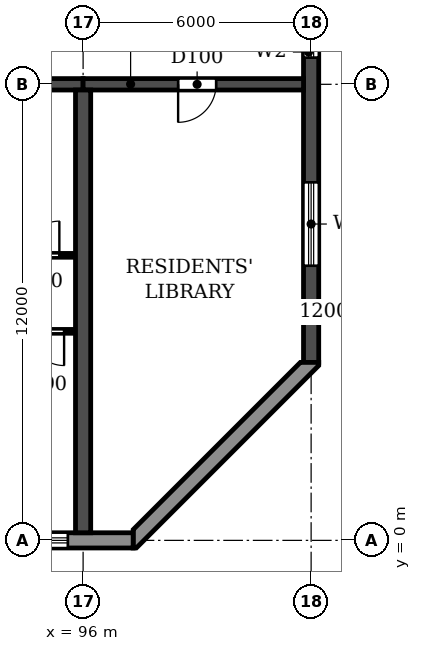
"""IFC4 building model, lengths in metres.
Left out: names, types, materials, properties, quantities, classifications, styles, units other than length and angle.
Written with IfcOpenShell. Run it as: python <this file> out.ifc"""

import sys

from ifc_helpers import new_model, si_unit, direction, frame, frame_2d, origin, place, context, subcontext, project, spatial, polyline, rectangle, outline, extrude, element, fill, save


model = new_model("IFC4")
c1 = context("Model", 3, precision=1e-05, world=origin(), true_north=direction((0.0, 1.0)))
c2 = subcontext(c1, "Body", "Model", "MODEL_VIEW")
j1 = project(units=[si_unit("LENGTHUNIT", "METRE"), si_unit("PLANEANGLEUNIT", "RADIAN")], contexts=[c1])
p1 = place(None, origin())
s1 = spatial("IfcSite", under=j1, at=p1, CompositionType="ELEMENT")
p2 = place(p1, origin())
s2 = spatial("IfcBuilding", under=s1, at=p2, CompositionType="ELEMENT")
p3 = place(p2, frame((0.0, 0.0, 33.3)))
s3 = spatial("IfcBuildingStorey", under=s2, at=p3, CompositionType="ELEMENT", Elevation=33.3)
p4 = place(p3, frame((96.0, 0.2, 0.0), z_axis=(0.0, 0.0, 1.0), x_axis=(0.0, 1.0, 0.0)))
e1 = element("IfcWall", 1, at=p4, inside=s3, PredefinedType="SHEAR", context=c2, shape_type="SweptSolid", body=[
    extrude(rectangle(XDim=11.65, YDim=0.4, at=frame_2d((5.825, 0.0))), origin(), (0.0, 0.0, 1.0), 3.05),
])
p5 = place(p3, frame((102.0, 4.683, 0.0), z_axis=(0.0, 0.0, 1.0), x_axis=(0.0, 1.0, 0.0)))
e2 = element("IfcWall", 2, at=p5, inside=s3, PredefinedType="SHEAR", context=c2, shape_type="SweptSolid", body=[
    extrude(rectangle(XDim=35.434, YDim=0.4, at=frame_2d((17.717, 0.0))), origin(), (0.0, 0.0, 1.0), 3.05),
])
p6 = place(p5, frame((15.917, 0.0, 0.9)))
e3 = element("IfcOpeningElement", 3, at=p6, cuts=e2, PredefinedType="OPENING", context=c2, shape_type="SweptSolid", body=[
    extrude(rectangle(XDim=1.2, YDim=1.5, at=frame_2d((0.6, 0.75))), frame((0.0, 0.21, 0.0), z_axis=(0.0, -1.0, 0.0), x_axis=(1.0, 0.0, 0.0)), (0.0, 0.0, 1.0), 0.42),
])
p7 = place(p5, frame((23.817, 0.0, 0.9)))
e4 = element("IfcOpeningElement", 4, at=p7, cuts=e2, PredefinedType="OPENING", context=c2, shape_type="SweptSolid", body=[
    extrude(rectangle(XDim=1.2, YDim=1.5, at=frame_2d((0.6, 0.75))), frame((0.0, 0.21, 0.0), z_axis=(0.0, -1.0, 0.0), x_axis=(1.0, 0.0, 0.0)), (0.0, 0.0, 1.0), 0.42),
])
p8 = place(p5, frame((8.017, 0.0, 0.9)))
e5 = element("IfcOpeningElement", 5, at=p8, cuts=e2, PredefinedType="OPENING", context=c2, shape_type="SweptSolid", body=[
    extrude(rectangle(XDim=1.2, YDim=1.5, at=frame_2d((0.6, 0.75))), frame((0.0, 0.21, 0.0), z_axis=(0.0, -1.0, 0.0), x_axis=(1.0, 0.0, 0.0)), (0.0, 0.0, 1.0), 0.42),
])
p9 = place(p5, frame((29.493, 0.0, 0.6)))
e6 = element("IfcOpeningElement", 6, at=p9, cuts=e2, PredefinedType="OPENING", context=c2, shape_type="SweptSolid", body=[
    extrude(rectangle(XDim=2.2, YDim=1.8, at=frame_2d((1.1, 0.9))), frame((0.0, 0.21, 0.0), z_axis=(0.0, -1.0, 0.0), x_axis=(1.0, 0.0, 0.0)), (0.0, 0.0, 1.0), 0.42),
])
p10 = place(p5, frame((2.541, 0.0, 0.6)))
e7 = element("IfcOpeningElement", 7, at=p10, cuts=e2, PredefinedType="OPENING", context=c2, shape_type="SweptSolid", body=[
    extrude(rectangle(XDim=2.2, YDim=1.8, at=frame_2d((1.1, 0.9))), frame((0.0, 0.21, 0.0), z_axis=(0.0, -1.0, 0.0), x_axis=(1.0, 0.0, 0.0)), (0.0, 0.0, 1.0), 0.42),
])
p11 = place(p3, frame((90.0, 12.0, 0.0), z_axis=(0.0, 0.0, 1.0), x_axis=(1.0, 0.0, 0.0)))
e8 = element("IfcWall", 8, at=p11, inside=s3, PredefinedType="SHEAR", context=c2, shape_type="SweptSolid", body=[
    extrude(rectangle(XDim=6.0, YDim=0.3, at=frame_2d((3.0, 0.0))), origin(), (0.0, 0.0, 1.0), 2.45),
])
p12 = place(p11, frame((2.45, 0.0, 0.0)))
e9 = element("IfcOpeningElement", 9, at=p12, cuts=e8, PredefinedType="OPENING", context=c2, shape_type="SweptSolid", body=[
    extrude(rectangle(XDim=1.0, YDim=2.1, at=frame_2d((0.5, 1.05))), frame((0.0, 0.16, 0.0), z_axis=(0.0, -1.0, 0.0), x_axis=(1.0, 0.0, 0.0)), (0.0, 0.0, 1.0), 0.32),
])
p13 = place(p3, frame((96.0, 12.0, 0.0), z_axis=(0.0, 0.0, 1.0), x_axis=(1.0, 0.0, 0.0)))
e10 = element("IfcWall", 10, at=p13, inside=s3, PredefinedType="SHEAR", context=c2, shape_type="SweptSolid", body=[
    extrude(rectangle(XDim=5.8, YDim=0.3, at=frame_2d((2.9, 0.0))), origin(), (0.0, 0.0, 1.0), 2.45),
])
p14 = place(p13, frame((2.5, 0.0, 0.0)))
e11 = element("IfcOpeningElement", 11, at=p14, cuts=e10, PredefinedType="OPENING", context=c2, shape_type="SweptSolid", body=[
    extrude(rectangle(XDim=1.0, YDim=2.1, at=frame_2d((0.5, 1.05))), frame((0.0, 0.16, 0.0), z_axis=(0.0, -1.0, 0.0), x_axis=(1.0, 0.0, 0.0)), (0.0, 0.0, 1.0), 0.32),
])
p15 = place(p3, frame((4.683, 0.0, 0.0), z_axis=(0.0, 0.0, 1.0), x_axis=(1.0, 0.0, 0.0)))
e12 = element("IfcWall", 12, at=p15, inside=s3, PredefinedType="STANDARD", context=c2, shape_type="SweptSolid", body=[
    extrude(rectangle(XDim=92.634, YDim=0.4, at=frame_2d((46.317, 0.0))), origin(), (0.0, 0.0, 1.0), 3.05),
])
p16 = place(p15, frame((1.717, 0.0, 0.9)))
e13 = element("IfcOpeningElement", 13, at=p16, cuts=e12, PredefinedType="OPENING", context=c2, shape_type="SweptSolid", body=[
    extrude(rectangle(XDim=2.2, YDim=1.5, at=frame_2d((1.1, 0.75))), frame((0.0, 0.21, 0.0), z_axis=(0.0, -1.0, 0.0), x_axis=(1.0, 0.0, 0.0)), (0.0, 0.0, 1.0), 0.42),
])
p17 = place(p15, frame((4.717, 0.0, 0.9)))
e14 = element("IfcOpeningElement", 14, at=p17, cuts=e12, PredefinedType="OPENING", context=c2, shape_type="SweptSolid", body=[
    extrude(rectangle(XDim=2.2, YDim=1.5, at=frame_2d((1.1, 0.75))), frame((0.0, 0.21, 0.0), z_axis=(0.0, -1.0, 0.0), x_axis=(1.0, 0.0, 0.0)), (0.0, 0.0, 1.0), 0.42),
])
p18 = place(p15, frame((7.917, 0.0, 0.0)))
e15 = element("IfcOpeningElement", 15, at=p18, cuts=e12, PredefinedType="OPENING", context=c2, shape_type="SweptSolid", body=[
    extrude(rectangle(XDim=1.8, YDim=2.4, at=frame_2d((0.9, 1.2))), frame((0.0, 0.21, 0.0), z_axis=(0.0, -1.0, 0.0), x_axis=(1.0, 0.0, 0.0)), (0.0, 0.0, 1.0), 0.42),
])
p19 = place(p15, frame((10.717, 0.0, 0.9)))
e16 = element("IfcOpeningElement", 16, at=p19, cuts=e12, PredefinedType="OPENING", context=c2, shape_type="SweptSolid", body=[
    extrude(rectangle(XDim=2.2, YDim=1.5, at=frame_2d((1.1, 0.75))), frame((0.0, 0.21, 0.0), z_axis=(0.0, -1.0, 0.0), x_axis=(1.0, 0.0, 0.0)), (0.0, 0.0, 1.0), 0.42),
])
p20 = place(p15, frame((13.717, 0.0, 0.9)))
e17 = element("IfcOpeningElement", 17, at=p20, cuts=e12, PredefinedType="OPENING", context=c2, shape_type="SweptSolid", body=[
    extrude(rectangle(XDim=2.2, YDim=1.5, at=frame_2d((1.1, 0.75))), frame((0.0, 0.21, 0.0), z_axis=(0.0, -1.0, 0.0), x_axis=(1.0, 0.0, 0.0)), (0.0, 0.0, 1.0), 0.42),
])
p21 = place(p15, frame((16.717, 0.0, 0.9)))
e18 = element("IfcOpeningElement", 18, at=p21, cuts=e12, PredefinedType="OPENING", context=c2, shape_type="SweptSolid", body=[
    extrude(rectangle(XDim=2.2, YDim=1.5, at=frame_2d((1.1, 0.75))), frame((0.0, 0.21, 0.0), z_axis=(0.0, -1.0, 0.0), x_axis=(1.0, 0.0, 0.0)), (0.0, 0.0, 1.0), 0.42),
])
p22 = place(p15, frame((19.717, 0.0, 0.9)))
e19 = element("IfcOpeningElement", 19, at=p22, cuts=e12, PredefinedType="OPENING", context=c2, shape_type="SweptSolid", body=[
    extrude(rectangle(XDim=2.2, YDim=1.5, at=frame_2d((1.1, 0.75))), frame((0.0, 0.21, 0.0), z_axis=(0.0, -1.0, 0.0), x_axis=(1.0, 0.0, 0.0)), (0.0, 0.0, 1.0), 0.42),
])
p23 = place(p15, frame((22.917, 0.0, 0.0)))
e20 = element("IfcOpeningElement", 20, at=p23, cuts=e12, PredefinedType="OPENING", context=c2, shape_type="SweptSolid", body=[
    extrude(rectangle(XDim=1.8, YDim=2.4, at=frame_2d((0.9, 1.2))), frame((0.0, 0.21, 0.0), z_axis=(0.0, -1.0, 0.0), x_axis=(1.0, 0.0, 0.0)), (0.0, 0.0, 1.0), 0.42),
])
p24 = place(p15, frame((25.717, 0.0, 0.9)))
e21 = element("IfcOpeningElement", 21, at=p24, cuts=e12, PredefinedType="OPENING", context=c2, shape_type="SweptSolid", body=[
    extrude(rectangle(XDim=2.2, YDim=1.5, at=frame_2d((1.1, 0.75))), frame((0.0, 0.21, 0.0), z_axis=(0.0, -1.0, 0.0), x_axis=(1.0, 0.0, 0.0)), (0.0, 0.0, 1.0), 0.42),
])
p25 = place(p15, frame((28.717, 0.0, 0.9)))
e22 = element("IfcOpeningElement", 22, at=p25, cuts=e12, PredefinedType="OPENING", context=c2, shape_type="SweptSolid", body=[
    extrude(rectangle(XDim=2.2, YDim=1.5, at=frame_2d((1.1, 0.75))), frame((0.0, 0.21, 0.0), z_axis=(0.0, -1.0, 0.0), x_axis=(1.0, 0.0, 0.0)), (0.0, 0.0, 1.0), 0.42),
])
p26 = place(p15, frame((31.717, 0.0, 0.9)))
e23 = element("IfcOpeningElement", 23, at=p26, cuts=e12, PredefinedType="OPENING", context=c2, shape_type="SweptSolid", body=[
    extrude(rectangle(XDim=2.2, YDim=1.5, at=frame_2d((1.1, 0.75))), frame((0.0, 0.21, 0.0), z_axis=(0.0, -1.0, 0.0), x_axis=(1.0, 0.0, 0.0)), (0.0, 0.0, 1.0), 0.42),
])
p27 = place(p15, frame((34.717, 0.0, 0.9)))
e24 = element("IfcOpeningElement", 24, at=p27, cuts=e12, PredefinedType="OPENING", context=c2, shape_type="SweptSolid", body=[
    extrude(rectangle(XDim=2.2, YDim=1.5, at=frame_2d((1.1, 0.75))), frame((0.0, 0.21, 0.0), z_axis=(0.0, -1.0, 0.0), x_axis=(1.0, 0.0, 0.0)), (0.0, 0.0, 1.0), 0.42),
])
p28 = place(p15, frame((37.717, 0.0, 0.9)))
e25 = element("IfcOpeningElement", 25, at=p28, cuts=e12, PredefinedType="OPENING", context=c2, shape_type="SweptSolid", body=[
    extrude(rectangle(XDim=2.2, YDim=1.5, at=frame_2d((1.1, 0.75))), frame((0.0, 0.21, 0.0), z_axis=(0.0, -1.0, 0.0), x_axis=(1.0, 0.0, 0.0)), (0.0, 0.0, 1.0), 0.42),
])
p29 = place(p15, frame((40.717, 0.0, 0.9)))
e26 = element("IfcOpeningElement", 26, at=p29, cuts=e12, PredefinedType="OPENING", context=c2, shape_type="SweptSolid", body=[
    extrude(rectangle(XDim=2.2, YDim=1.5, at=frame_2d((1.1, 0.75))), frame((0.0, 0.21, 0.0), z_axis=(0.0, -1.0, 0.0), x_axis=(1.0, 0.0, 0.0)), (0.0, 0.0, 1.0), 0.42),
])
p30 = place(p15, frame((43.717, 0.0, 0.9)))
e27 = element("IfcOpeningElement", 27, at=p30, cuts=e12, PredefinedType="OPENING", context=c2, shape_type="SweptSolid", body=[
    extrude(rectangle(XDim=2.2, YDim=1.5, at=frame_2d((1.1, 0.75))), frame((0.0, 0.21, 0.0), z_axis=(0.0, -1.0, 0.0), x_axis=(1.0, 0.0, 0.0)), (0.0, 0.0, 1.0), 0.42),
])
p31 = place(p15, frame((46.917, 0.0, 0.0)))
e28 = element("IfcOpeningElement", 28, at=p31, cuts=e12, PredefinedType="OPENING", context=c2, shape_type="SweptSolid", body=[
    extrude(rectangle(XDim=1.8, YDim=2.4, at=frame_2d((0.9, 1.2))), frame((0.0, 0.21, 0.0), z_axis=(0.0, -1.0, 0.0), x_axis=(1.0, 0.0, 0.0)), (0.0, 0.0, 1.0), 0.42),
])
p32 = place(p15, frame((49.717, 0.0, 0.9)))
e29 = element("IfcOpeningElement", 29, at=p32, cuts=e12, PredefinedType="OPENING", context=c2, shape_type="SweptSolid", body=[
    extrude(rectangle(XDim=2.2, YDim=1.5, at=frame_2d((1.1, 0.75))), frame((0.0, 0.21, 0.0), z_axis=(0.0, -1.0, 0.0), x_axis=(1.0, 0.0, 0.0)), (0.0, 0.0, 1.0), 0.42),
])
p33 = place(p15, frame((52.717, 0.0, 0.9)))
e30 = element("IfcOpeningElement", 30, at=p33, cuts=e12, PredefinedType="OPENING", context=c2, shape_type="SweptSolid", body=[
    extrude(rectangle(XDim=2.2, YDim=1.5, at=frame_2d((1.1, 0.75))), frame((0.0, 0.21, 0.0), z_axis=(0.0, -1.0, 0.0), x_axis=(1.0, 0.0, 0.0)), (0.0, 0.0, 1.0), 0.42),
])
p34 = place(p15, frame((55.717, 0.0, 0.9)))
e31 = element("IfcOpeningElement", 31, at=p34, cuts=e12, PredefinedType="OPENING", context=c2, shape_type="SweptSolid", body=[
    extrude(rectangle(XDim=2.2, YDim=1.5, at=frame_2d((1.1, 0.75))), frame((0.0, 0.21, 0.0), z_axis=(0.0, -1.0, 0.0), x_axis=(1.0, 0.0, 0.0)), (0.0, 0.0, 1.0), 0.42),
])
p35 = place(p15, frame((58.917, 0.0, 0.0)))
e32 = element("IfcOpeningElement", 32, at=p35, cuts=e12, PredefinedType="OPENING", context=c2, shape_type="SweptSolid", body=[
    extrude(rectangle(XDim=1.8, YDim=2.4, at=frame_2d((0.9, 1.2))), frame((0.0, 0.21, 0.0), z_axis=(0.0, -1.0, 0.0), x_axis=(1.0, 0.0, 0.0)), (0.0, 0.0, 1.0), 0.42),
])
p36 = place(p15, frame((61.717, 0.0, 0.9)))
e33 = element("IfcOpeningElement", 33, at=p36, cuts=e12, PredefinedType="OPENING", context=c2, shape_type="SweptSolid", body=[
    extrude(rectangle(XDim=2.2, YDim=1.5, at=frame_2d((1.1, 0.75))), frame((0.0, 0.21, 0.0), z_axis=(0.0, -1.0, 0.0), x_axis=(1.0, 0.0, 0.0)), (0.0, 0.0, 1.0), 0.42),
])
p37 = place(p15, frame((64.717, 0.0, 0.9)))
e34 = element("IfcOpeningElement", 34, at=p37, cuts=e12, PredefinedType="OPENING", context=c2, shape_type="SweptSolid", body=[
    extrude(rectangle(XDim=2.2, YDim=1.5, at=frame_2d((1.1, 0.75))), frame((0.0, 0.21, 0.0), z_axis=(0.0, -1.0, 0.0), x_axis=(1.0, 0.0, 0.0)), (0.0, 0.0, 1.0), 0.42),
])
p38 = place(p15, frame((67.717, 0.0, 0.9)))
e35 = element("IfcOpeningElement", 35, at=p38, cuts=e12, PredefinedType="OPENING", context=c2, shape_type="SweptSolid", body=[
    extrude(rectangle(XDim=2.2, YDim=1.5, at=frame_2d((1.1, 0.75))), frame((0.0, 0.21, 0.0), z_axis=(0.0, -1.0, 0.0), x_axis=(1.0, 0.0, 0.0)), (0.0, 0.0, 1.0), 0.42),
])
p39 = place(p15, frame((70.917, 0.0, 0.0)))
e36 = element("IfcOpeningElement", 36, at=p39, cuts=e12, PredefinedType="OPENING", context=c2, shape_type="SweptSolid", body=[
    extrude(rectangle(XDim=1.8, YDim=2.4, at=frame_2d((0.9, 1.2))), frame((0.0, 0.21, 0.0), z_axis=(0.0, -1.0, 0.0), x_axis=(1.0, 0.0, 0.0)), (0.0, 0.0, 1.0), 0.42),
])
p40 = place(p15, frame((73.717, 0.0, 0.9)))
e37 = element("IfcOpeningElement", 37, at=p40, cuts=e12, PredefinedType="OPENING", context=c2, shape_type="SweptSolid", body=[
    extrude(rectangle(XDim=2.2, YDim=1.5, at=frame_2d((1.1, 0.75))), frame((0.0, 0.21, 0.0), z_axis=(0.0, -1.0, 0.0), x_axis=(1.0, 0.0, 0.0)), (0.0, 0.0, 1.0), 0.42),
])
p41 = place(p15, frame((76.717, 0.0, 0.9)))
e38 = element("IfcOpeningElement", 38, at=p41, cuts=e12, PredefinedType="OPENING", context=c2, shape_type="SweptSolid", body=[
    extrude(rectangle(XDim=2.2, YDim=1.5, at=frame_2d((1.1, 0.75))), frame((0.0, 0.21, 0.0), z_axis=(0.0, -1.0, 0.0), x_axis=(1.0, 0.0, 0.0)), (0.0, 0.0, 1.0), 0.42),
])
p42 = place(p15, frame((79.717, 0.0, 0.9)))
e39 = element("IfcOpeningElement", 39, at=p42, cuts=e12, PredefinedType="OPENING", context=c2, shape_type="SweptSolid", body=[
    extrude(rectangle(XDim=2.2, YDim=1.5, at=frame_2d((1.1, 0.75))), frame((0.0, 0.21, 0.0), z_axis=(0.0, -1.0, 0.0), x_axis=(1.0, 0.0, 0.0)), (0.0, 0.0, 1.0), 0.42),
])
p43 = place(p15, frame((82.717, 0.0, 0.9)))
e40 = element("IfcOpeningElement", 40, at=p43, cuts=e12, PredefinedType="OPENING", context=c2, shape_type="SweptSolid", body=[
    extrude(rectangle(XDim=2.2, YDim=1.5, at=frame_2d((1.1, 0.75))), frame((0.0, 0.21, 0.0), z_axis=(0.0, -1.0, 0.0), x_axis=(1.0, 0.0, 0.0)), (0.0, 0.0, 1.0), 0.42),
])
p44 = place(p15, frame((85.717, 0.0, 0.9)))
e41 = element("IfcOpeningElement", 41, at=p44, cuts=e12, PredefinedType="OPENING", context=c2, shape_type="SweptSolid", body=[
    extrude(rectangle(XDim=2.2, YDim=1.5, at=frame_2d((1.1, 0.75))), frame((0.0, 0.21, 0.0), z_axis=(0.0, -1.0, 0.0), x_axis=(1.0, 0.0, 0.0)), (0.0, 0.0, 1.0), 0.42),
])
p45 = place(p15, frame((88.717, 0.0, 0.9)))
e42 = element("IfcOpeningElement", 42, at=p45, cuts=e12, PredefinedType="OPENING", context=c2, shape_type="SweptSolid", body=[
    extrude(rectangle(XDim=2.2, YDim=1.5, at=frame_2d((1.1, 0.75))), frame((0.0, 0.21, 0.0), z_axis=(0.0, -1.0, 0.0), x_axis=(1.0, 0.0, 0.0)), (0.0, 0.0, 1.0), 0.42),
])
p46 = place(p3, origin())
e43 = element("IfcWall", 43, at=p46, inside=s3, PredefinedType="STANDARD", context=c2, shape_type="SweptSolid", body=[
    extrude(outline(polyline([(97.317, -0.2), (97.4, -0.2), (102.2, 4.6), (102.2, 4.683), (101.717, 4.683), (97.317, 0.283), (97.317, -0.2)])), origin(), (0.0, 0.0, 1.0), 3.05),
])
p47 = place(p3, frame((92.95, 5.5, 0.0), z_axis=(0.0, 0.0, 1.0), x_axis=(1.0, 0.0, 0.0)))
e44 = element("IfcWall", 44, at=p47, inside=s3, PredefinedType="PARTITIONING", context=c2, shape_type="SweptSolid", body=[
    extrude(rectangle(XDim=2.84, YDim=0.1, at=frame_2d((1.42, 0.0))), origin(), (0.0, 0.0, 1.0), 3.05),
])
p48 = place(p47, frame((1.65, 0.0, 0.0)))
e45 = element("IfcOpeningElement", 45, at=p48, cuts=e44, PredefinedType="OPENING", context=c2, shape_type="SweptSolid", body=[
    extrude(rectangle(XDim=0.9, YDim=2.1, at=frame_2d((0.45, 1.05))), frame((0.0, 0.06, 0.0), z_axis=(0.0, -1.0, 0.0), x_axis=(1.0, 0.0, 0.0)), (0.0, 0.0, 1.0), 0.12),
])
p49 = place(p3, frame((93.8, 7.5, 0.0), z_axis=(0.0, 0.0, 1.0), x_axis=(1.0, 0.0, 0.0)))
e46 = element("IfcWall", 46, at=p49, inside=s3, PredefinedType="PARTITIONING", context=c2, shape_type="SweptSolid", body=[
    extrude(rectangle(XDim=1.99, YDim=0.1, at=frame_2d((0.995, 0.0))), origin(), (0.0, 0.0, 1.0), 3.05),
])
p50 = place(p49, frame((0.675, 0.0, 0.0)))
e47 = element("IfcOpeningElement", 47, at=p50, cuts=e46, PredefinedType="OPENING", context=c2, shape_type="SweptSolid", body=[
    extrude(rectangle(XDim=0.9, YDim=2.1, at=frame_2d((0.45, 1.05))), frame((0.0, 0.06, 0.0), z_axis=(0.0, -1.0, 0.0), x_axis=(1.0, 0.0, 0.0)), (0.0, 0.0, 1.0), 0.12),
])
p51 = place(p45, origin())
e48 = element("IfcWindow", 48, at=p51, inside=s3, PartitioningType="DOUBLE_PANEL_HORIZONTAL", PredefinedType="WINDOW", context=c2, shape_type="SweptSolid", body=[
    extrude(rectangle(XDim=2.2, YDim=1.5, at=frame_2d((1.1, 0.75))), frame((0.0, 0.03, 0.0), z_axis=(0.0, -1.0, 0.0), x_axis=(1.0, 0.0, 0.0)), (0.0, 0.0, 1.0), 0.06),
])
fill(e42, e48)
p52 = place(p8, origin())
e49 = element("IfcWindow", 49, at=p52, inside=s3, PartitioningType="SINGLE_PANEL", PredefinedType="WINDOW", context=c2, shape_type="SweptSolid", body=[
    extrude(rectangle(XDim=1.2, YDim=1.5, at=frame_2d((0.6, 0.75))), frame((0.0, 0.03, 0.0), z_axis=(0.0, -1.0, 0.0), x_axis=(1.0, 0.0, 0.0)), (0.0, 0.0, 1.0), 0.06),
])
fill(e5, e49)
p53 = place(p10, origin())
e50 = element("IfcWindow", 50, at=p53, inside=s3, PartitioningType="DOUBLE_PANEL_HORIZONTAL", PredefinedType="WINDOW", context=c2, shape_type="SweptSolid", body=[
    extrude(rectangle(XDim=2.2, YDim=1.8, at=frame_2d((1.1, 0.9))), frame((0.0, 0.03, 0.0), z_axis=(0.0, -1.0, 0.0), x_axis=(1.0, 0.0, 0.0)), (0.0, 0.0, 1.0), 0.06),
])
fill(e7, e50)
p54 = place(p50, origin())
e51 = element("IfcDoor", 51, at=p54, inside=s3, OperationType="SINGLE_SWING_RIGHT", PredefinedType="DOOR", context=c2, shape_type="SweptSolid", body=[
    extrude(rectangle(XDim=0.9, YDim=2.1, at=frame_2d((0.45, 1.05))), frame((0.0, 0.025, 0.0), z_axis=(0.0, -1.0, 0.0), x_axis=(1.0, 0.0, 0.0)), (0.0, 0.0, 1.0), 0.05),
])
fill(e47, e51)
p55 = place(p48, frame((0.9, 0.0, 0.0), z_axis=(0.0, 0.0, 1.0), x_axis=(-1.0, 0.0, 0.0)))
e52 = element("IfcDoor", 52, at=p55, inside=s3, OperationType="SINGLE_SWING_LEFT", PredefinedType="DOOR", context=c2, shape_type="SweptSolid", body=[
    extrude(rectangle(XDim=0.9, YDim=2.1, at=frame_2d((0.45, 1.05))), frame((0.0, 0.025, 0.0), z_axis=(0.0, -1.0, 0.0), x_axis=(1.0, 0.0, 0.0)), (0.0, 0.0, 1.0), 0.05),
])
fill(e45, e52)
p56 = place(p14, frame((1.0, 0.0, 0.0), z_axis=(0.0, 0.0, 1.0), x_axis=(-1.0, 0.0, 0.0)))
e53 = element("IfcDoor", 53, at=p56, inside=s3, OperationType="SINGLE_SWING_RIGHT", PredefinedType="DOOR", context=c2, shape_type="SweptSolid", body=[
    extrude(rectangle(XDim=1.0, YDim=2.1, at=frame_2d((0.5, 1.05))), frame((0.0, 0.025, 0.0), z_axis=(0.0, -1.0, 0.0), x_axis=(1.0, 0.0, 0.0)), (0.0, 0.0, 1.0), 0.05),
])
fill(e11, e53)
save(model, sys.argv[1])
